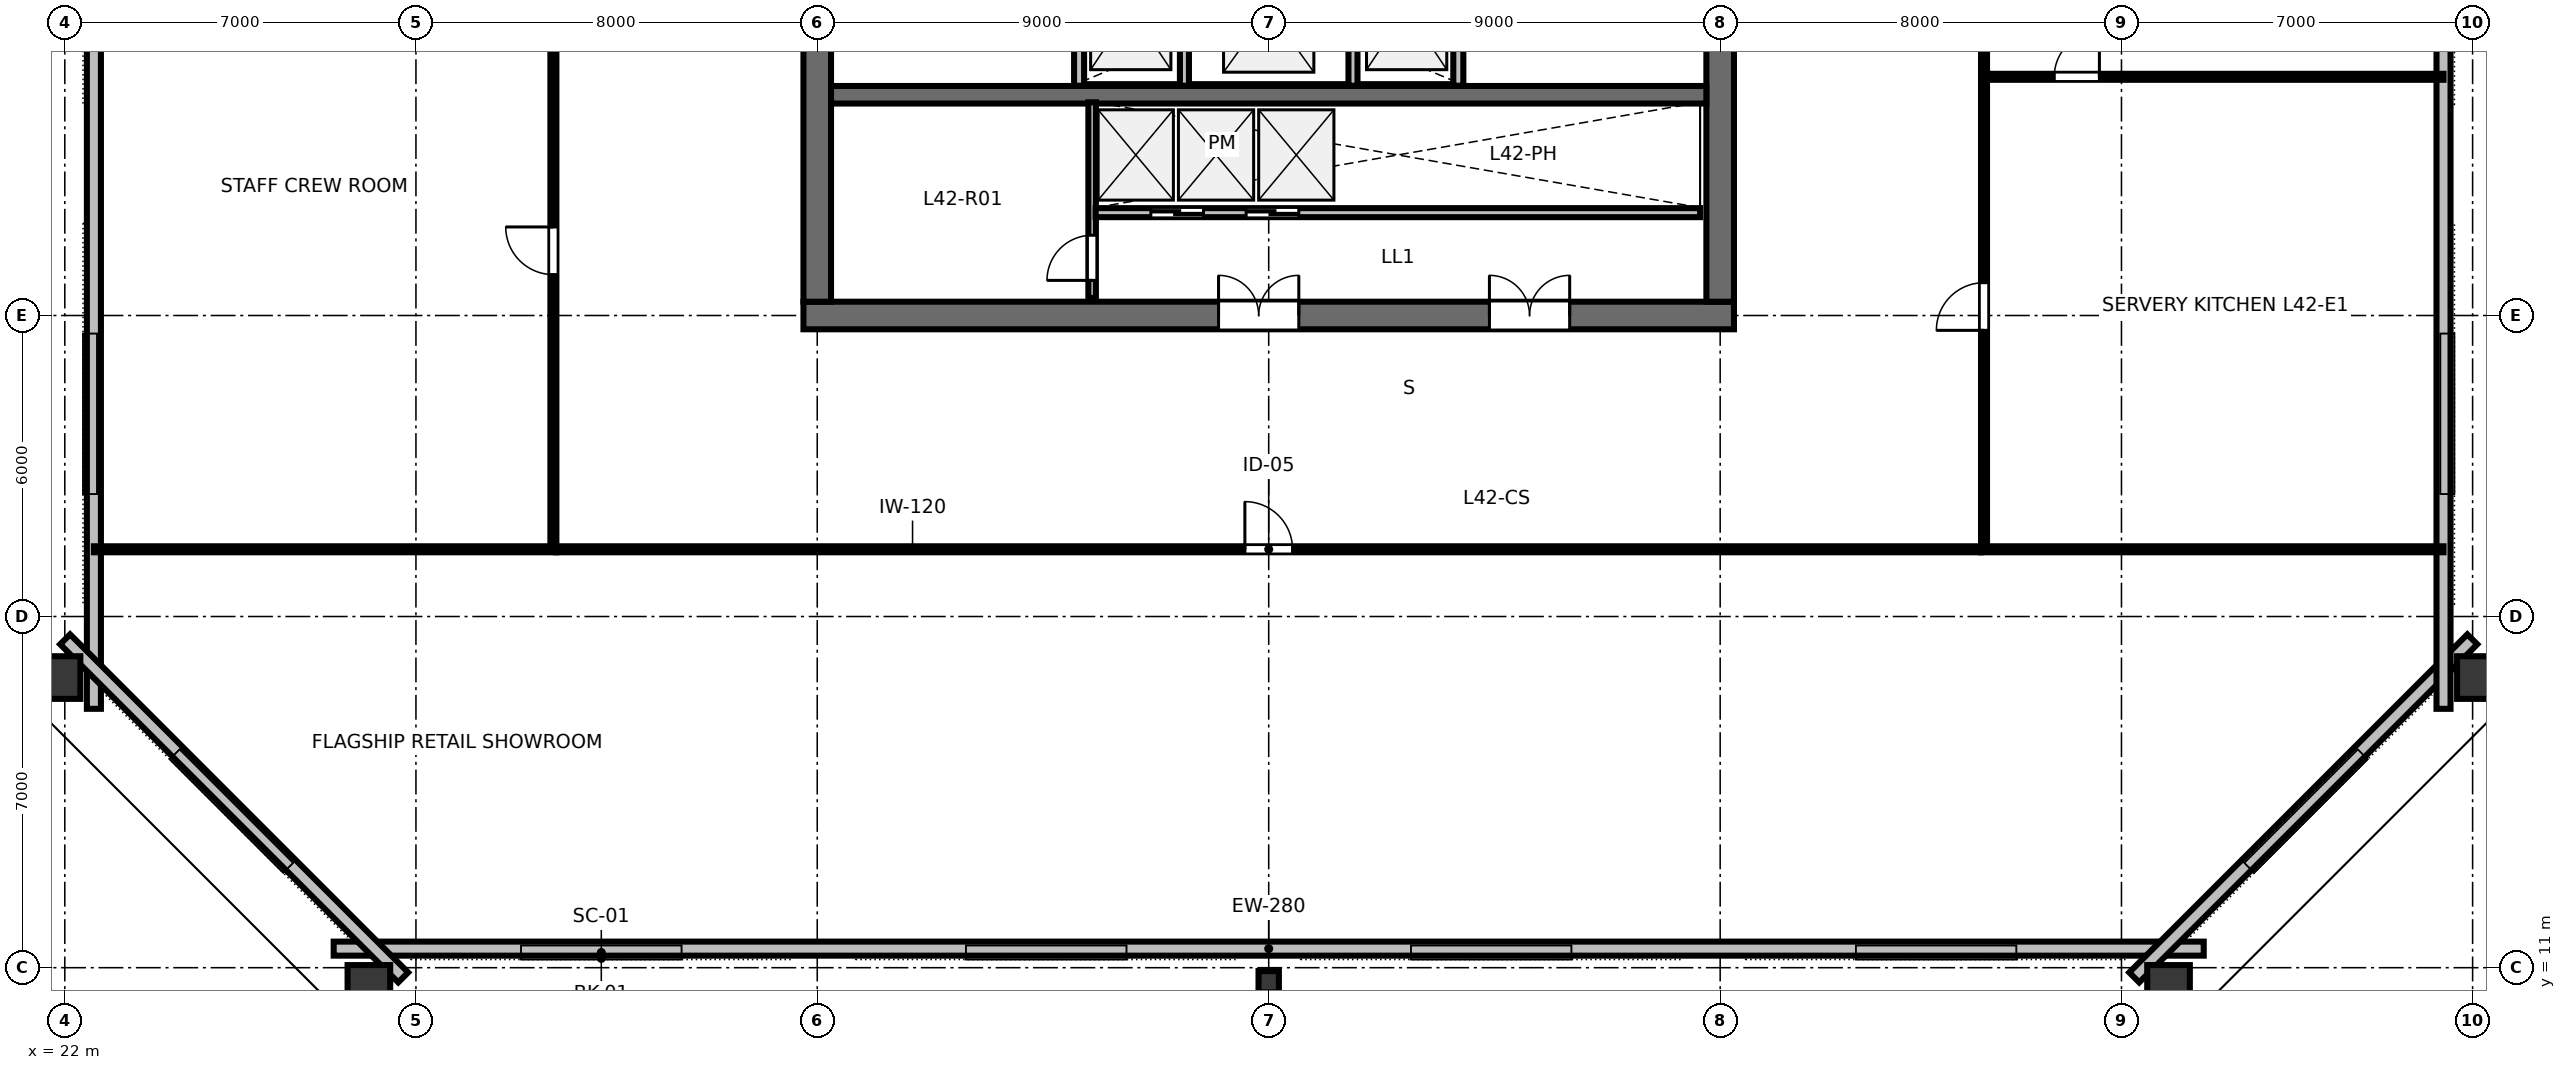
"""IFC4 building model, lengths in metres.
Left out: names, types, materials, properties, quantities, classifications, styles, units other than length and angle.
Written with IfcOpenShell. Run it as: python <this file> out.ifc"""

import sys

from ifc_helpers import new_model, si_unit, direction, frame, frame_2d, origin, origin_2d, place, context, subcontext, project, spatial, rectangle, hollow_rectangle, i_section, extrude, element, fill, save


model = new_model("IFC4")
c1 = context("Model", 3, precision=1e-05, world=origin(), true_north=direction((0.0, 1.0)))
c2 = subcontext(c1, "Body", "Model", "MODEL_VIEW")
j1 = project(units=[si_unit("LENGTHUNIT", "METRE"), si_unit("PLANEANGLEUNIT", "RADIAN")], contexts=[c1])
p1 = place(None, origin())
s1 = spatial("IfcSite", under=j1, at=p1, CompositionType="ELEMENT")
p2 = place(p1, origin())
s2 = spatial("IfcBuilding", under=s1, at=p2, CompositionType="ELEMENT")
p3 = place(p2, frame((0.0, 0.0, 160.0)))
s3 = spatial("IfcBuildingStorey", under=s2, at=p3, CompositionType="ELEMENT", Elevation=160.0)
p4 = place(p3, frame((36.725, 24.0, 0.0), z_axis=(0.0, 0.0, 1.0), x_axis=(1.0, 0.0, 0.0)))
e1 = element("IfcWall", 1, at=p4, inside=s3, PredefinedType="SHEAR", context=c2, shape_type="SweptSolid", body=[
    extrude(rectangle(XDim=18.55, YDim=0.55, at=frame_2d((9.275, 0.0))), origin(), (0.0, 0.0, 1.0), 3.36),
])
p5 = place(p4, frame((8.275, 0.0, 0.0)))
e2 = element("IfcOpeningElement", 2, at=p5, cuts=e1, PredefinedType="OPENING", context=c2, shape_type="SweptSolid", body=[
    extrude(rectangle(XDim=1.6, YDim=2.15, at=frame_2d((0.8, 1.075))), frame((0.0, 0.285, 0.0), z_axis=(0.0, -1.0, 0.0), x_axis=(1.0, 0.0, 0.0)), (0.0, 0.0, 1.0), 0.57),
])
p6 = place(p4, frame((13.675, 0.0, 0.0)))
e3 = element("IfcOpeningElement", 3, at=p6, cuts=e1, PredefinedType="OPENING", context=c2, shape_type="SweptSolid", body=[
    extrude(rectangle(XDim=1.6, YDim=2.15, at=frame_2d((0.8, 1.075))), frame((0.0, 0.285, 0.0), z_axis=(0.0, -1.0, 0.0), x_axis=(1.0, 0.0, 0.0)), (0.0, 0.0, 1.0), 0.57),
])
p7 = place(p3, frame((37.0, 24.275, 0.0), z_axis=(0.0, 0.0, 1.0), x_axis=(0.0, 1.0, 0.0)))
e4 = element("IfcWall", 4, at=p7, inside=s3, PredefinedType="SHEAR", context=c2, shape_type="SweptSolid", body=[
    extrude(rectangle(XDim=15.45, YDim=0.55, at=frame_2d((7.725, 0.0))), origin(), (0.0, 0.0, 1.0), 3.36),
])
p8 = place(p7, frame((5.25, 0.0, 0.0)))
e5 = element("IfcOpeningElement", 5, at=p8, cuts=e4, PredefinedType="OPENING", context=c2, shape_type="SweptSolid", body=[
    extrude(rectangle(XDim=1.15, YDim=2.15, at=frame_2d((0.575, 1.075))), frame((0.0, 0.285, 0.0), z_axis=(0.0, -1.0, 0.0), x_axis=(1.0, 0.0, 0.0)), (0.0, 0.0, 1.0), 0.57),
])
p9 = place(p3, frame((55.0, 24.275, 0.0), z_axis=(0.0, 0.0, 1.0), x_axis=(0.0, 1.0, 0.0)))
e6 = element("IfcWall", 6, at=p9, inside=s3, PredefinedType="SHEAR", context=c2, shape_type="SweptSolid", body=[
    extrude(rectangle(XDim=15.45, YDim=0.55, at=frame_2d((7.725, 0.0))), origin(), (0.0, 0.0, 1.0), 3.36),
])
p10 = place(p9, frame((5.25, 0.0, 0.0)))
e7 = element("IfcOpeningElement", 7, at=p10, cuts=e6, PredefinedType="OPENING", context=c2, shape_type="SweptSolid", body=[
    extrude(rectangle(XDim=1.15, YDim=2.15, at=frame_2d((0.575, 1.075))), frame((0.0, 0.285, 0.0), z_axis=(0.0, -1.0, 0.0), x_axis=(1.0, 0.0, 0.0)), (0.0, 0.0, 1.0), 0.57),
])
p11 = place(p3, frame((37.275, 28.4, 0.0), z_axis=(0.0, 0.0, 1.0), x_axis=(1.0, 0.0, 0.0)))
e8 = element("IfcWall", 8, at=p11, inside=s3, PredefinedType="SHEAR", context=c2, shape_type="SweptSolid", body=[
    extrude(rectangle(XDim=17.45, YDim=0.35, at=frame_2d((8.725, 0.0))), origin(), (0.0, 0.0, 1.0), 3.36),
])
p12 = place(p3, frame((28.062, 10.552, 0.0), z_axis=(0.0, 0.0, 1.0), x_axis=(1.0, 0.0, 0.0)))
e9 = element("IfcColumn", 9, at=p12, inside=s3, PredefinedType="COLUMN", context=c2, shape_type="SweptSolid", body=[
    extrude(hollow_rectangle(XDim=0.85, YDim=1.0, WallThickness=0.05, at=origin_2d()), origin(), (0.0, 0.0, 1.0), 3.358),
])
p13 = place(p3, frame((46.0, 10.72, 0.0), z_axis=(0.0, 0.0, 1.0), x_axis=(1.0, 0.0, 0.0)))
e10 = element("IfcColumn", 10, at=p13, inside=s3, PredefinedType="COLUMN", context=c2, shape_type="SweptSolid", body=[
    extrude(i_section(OverallWidth=0.406, OverallDepth=0.425, WebThickness=0.033, FlangeThickness=0.052, FilletRadius=0.025, at=origin_2d()), origin(), (0.0, 0.0, 1.0), 3.358),
])
for number, where, z_axis, x_axis in (
    (11, (63.938, 10.552, 0.0), (0.0, 0.0, 1.0), (1.0, 0.0, 0.0)),
    (12, (70.19, 16.783, 0.0), (0.0, 0.0, 1.0), (0.0, 1.0, 0.0)),
    (13, (21.81, 16.783, 0.0), (0.0, 0.0, 1.0), (0.0, 1.0, 0.0)),
):
    element("IfcColumn", number, at=place(p3, frame(where, z_axis=z_axis, x_axis=x_axis)), inside=s3, PredefinedType="COLUMN", context=c2, shape_type="SweptSolid", body=[
        extrude(hollow_rectangle(XDim=0.85, YDim=1.0, WallThickness=0.05, at=origin_2d()), origin(), (0.0, 0.0, 1.0), 3.358),
    ])
p14 = place(p3, frame((27.36, 11.38, 0.0), z_axis=(0.0, 0.0, 1.0), x_axis=(1.0, 0.0, 0.0)))
e14 = element("IfcWall", 14, at=p14, inside=s3, PredefinedType="STANDARD", context=c2, shape_type="SweptSolid", body=[
    extrude(rectangle(XDim=37.28, YDim=0.28, at=frame_2d((18.64, 0.0))), origin(), (0.0, 0.0, 1.0), 3.36),
])
p15 = place(p3, frame((63.254, 10.806, 0.0), z_axis=(0.0, 0.0, 1.0), x_axis=(0.707119588888, 0.707093973253, 0.0)))
e15 = element("IfcWall", 15, at=p15, inside=s3, PredefinedType="STANDARD", context=c2, shape_type="SweptSolid", body=[
    extrude(rectangle(XDim=9.531, YDim=0.28, at=frame_2d((4.766, 0.0))), origin(), (0.0, 0.0, 1.0), 3.36),
])
for number, where, z_axis, x_axis in (
    (16, (69.42, 16.16, 0.0), (0.0, 0.0, 1.0), (0.0, 1.0, 0.0)),
    (17, (22.58, 47.84, 0.0), (0.0, 0.0, 1.0), (0.0, -1.0, 0.0)),
):
    element("IfcWall", number, at=place(p3, frame(where, z_axis=z_axis, x_axis=x_axis)), inside=s3, PredefinedType="STANDARD", context=c2, shape_type="SweptSolid", body=[
        extrude(rectangle(XDim=31.68, YDim=0.28, at=frame_2d((15.84, 0.0))), origin(), (0.0, 0.0, 1.0), 3.36),
    ])
p16 = place(p3, frame((22.006, 17.545, 0.0), z_axis=(0.0, 0.0, 1.0), x_axis=(0.707119588888, -0.707093973253, 0.0)))
e18 = element("IfcWall", 18, at=p16, inside=s3, PredefinedType="STANDARD", context=c2, shape_type="SweptSolid", body=[
    extrude(rectangle(XDim=9.531, YDim=0.28, at=frame_2d((4.766, 0.0))), origin(), (0.0, 0.0, 1.0), 3.36),
])
p17 = place(p3, frame((42.22, 28.58, 0.0), z_axis=(0.0, 0.0, 1.0), x_axis=(0.0, 1.0, 0.0)))
e19 = element("IfcWall", 19, at=p17, inside=s3, PredefinedType="PARTITIONING", context=c2, shape_type="SweptSolid", body=[
    extrude(rectangle(XDim=3.04, YDim=0.2, at=frame_2d((1.52, 0.0))), origin(), (0.0, 0.0, 1.0), 3.36),
])
p18 = place(p17, frame((0.95, 0.0, 0.0)))
e20 = element("IfcOpeningElement", 20, at=p18, cuts=e19, PredefinedType="OPENING", context=c2, shape_type="SweptSolid", body=[
    extrude(rectangle(XDim=1.05, YDim=2.15, at=frame_2d((0.525, 1.075))), frame((0.0, 0.11, 0.0), z_axis=(0.0, -1.0, 0.0), x_axis=(1.0, 0.0, 0.0)), (0.0, 0.0, 1.0), 0.22),
])
p19 = place(p3, frame((49.78, 28.58, 0.0), z_axis=(0.0, 0.0, 1.0), x_axis=(0.0, 1.0, 0.0)))
e21 = element("IfcWall", 21, at=p19, inside=s3, PredefinedType="PARTITIONING", context=c2, shape_type="SweptSolid", body=[
    extrude(rectangle(XDim=3.04, YDim=0.2, at=frame_2d((1.52, 0.0))), origin(), (0.0, 0.0, 1.0), 3.36),
])
p20 = place(p19, frame((0.95, 0.0, 0.0)))
e22 = element("IfcOpeningElement", 22, at=p20, cuts=e21, PredefinedType="OPENING", context=c2, shape_type="SweptSolid", body=[
    extrude(rectangle(XDim=1.05, YDim=2.15, at=frame_2d((0.525, 1.075))), frame((0.0, 0.11, 0.0), z_axis=(0.0, -1.0, 0.0), x_axis=(1.0, 0.0, 0.0)), (0.0, 0.0, 1.0), 0.22),
])
for number, where, z_axis, x_axis in (
    (23, (44.32, 28.58, 0.0), (0.0, 0.0, 1.0), (0.0, 1.0, 0.0)),
    (24, (47.68, 28.58, 0.0), (0.0, 0.0, 1.0), (0.0, 1.0, 0.0)),
):
    element("IfcWall", number, at=place(p3, frame(where, z_axis=z_axis, x_axis=x_axis)), inside=s3, PredefinedType="PARTITIONING", context=c2, shape_type="SweptSolid", body=[
        extrude(rectangle(XDim=3.04, YDim=0.18, at=frame_2d((1.52, 0.0))), origin(), (0.0, 0.0, 1.0), 3.36),
    ])
p21 = place(p3, frame((42.48, 24.35, 0.0), z_axis=(0.0, 0.0, 1.0), x_axis=(0.0, 1.0, 0.0)))
e25 = element("IfcWall", 25, at=p21, inside=s3, PredefinedType="PARTITIONING", context=c2, shape_type="SweptSolid", body=[
    extrude(rectangle(XDim=3.9, YDim=0.15, at=frame_2d((1.95, 0.0))), origin(), (0.0, 0.0, 1.0), 3.36),
])
p22 = place(p21, frame((0.35, 0.0, 0.0)))
e26 = element("IfcOpeningElement", 26, at=p22, cuts=e25, PredefinedType="OPENING", context=c2, shape_type="SweptSolid", body=[
    extrude(rectangle(XDim=0.9, YDim=2.15, at=frame_2d((0.45, 1.075))), frame((0.0, 0.085, 0.0), z_axis=(0.0, -1.0, 0.0), x_axis=(1.0, 0.0, 0.0)), (0.0, 0.0, 1.0), 0.17),
])
p23 = place(p3, frame((42.55, 26.05, 0.0), z_axis=(0.0, 0.0, 1.0), x_axis=(1.0, 0.0, 0.0)))
e27 = element("IfcWall", 27, at=p23, inside=s3, PredefinedType="PARTITIONING", context=c2, shape_type="SweptSolid", body=[
    extrude(rectangle(XDim=12.05, YDim=0.18, at=frame_2d((6.025, 0.0))), origin(), (0.0, 0.0, 1.0), 3.36),
])
p24 = place(p23, frame((1.1, 0.0, 0.0)))
e28 = element("IfcOpeningElement", 28, at=p24, cuts=e27, PredefinedType="OPENING", context=c2, shape_type="SweptSolid", body=[
    extrude(rectangle(XDim=1.05, YDim=2.15, at=frame_2d((0.525, 1.075))), frame((0.0, 0.1, 0.0), z_axis=(0.0, -1.0, 0.0), x_axis=(1.0, 0.0, 0.0)), (0.0, 0.0, 1.0), 0.2),
])
p25 = place(p23, frame((3.0, 0.0, 0.0)))
e29 = element("IfcOpeningElement", 29, at=p25, cuts=e27, PredefinedType="OPENING", context=c2, shape_type="SweptSolid", body=[
    extrude(rectangle(XDim=1.05, YDim=2.15, at=frame_2d((0.525, 1.075))), frame((0.0, 0.1, 0.0), z_axis=(0.0, -1.0, 0.0), x_axis=(1.0, 0.0, 0.0)), (0.0, 0.0, 1.0), 0.2),
])
p26 = place(p3, frame((31.8, 19.34, 0.0), z_axis=(0.0, 0.0, 1.0), x_axis=(1.0, 0.0, 0.0)))
e30 = element("IfcWall", 30, at=p26, inside=s3, PredefinedType="PARTITIONING", context=c2, shape_type="SweptSolid", body=[
    extrude(rectangle(XDim=28.4, YDim=0.12, at=frame_2d((14.2, 0.0))), origin(), (0.0, 0.0, 1.0), 2.64),
])
p27 = place(p26, frame((13.725, 0.0, 0.0)))
e31 = element("IfcOpeningElement", 31, at=p27, cuts=e30, PredefinedType="OPENING", context=c2, shape_type="SweptSolid", body=[
    extrude(rectangle(XDim=0.95, YDim=2.15, at=frame_2d((0.475, 1.075))), frame((0.0, 0.07, 0.0), z_axis=(0.0, -1.0, 0.0), x_axis=(1.0, 0.0, 0.0)), (0.0, 0.0, 1.0), 0.14),
])
p28 = place(p3, frame((31.74, 19.4, 0.0), z_axis=(0.0, 0.0, 1.0), x_axis=(0.0, 1.0, 0.0)))
e32 = element("IfcWall", 32, at=p28, inside=s3, PredefinedType="PARTITIONING", context=c2, shape_type="SweptSolid", body=[
    extrude(rectangle(XDim=11.58, YDim=0.12, at=frame_2d((5.79, 0.0))), origin(), (0.0, 0.0, 1.0), 2.64),
])
p29 = place(p28, frame((5.415, 0.0, 0.0)))
e33 = element("IfcOpeningElement", 33, at=p29, cuts=e32, PredefinedType="OPENING", context=c2, shape_type="SweptSolid", body=[
    extrude(rectangle(XDim=0.95, YDim=2.15, at=frame_2d((0.475, 1.075))), frame((0.0, 0.07, 0.0), z_axis=(0.0, -1.0, 0.0), x_axis=(1.0, 0.0, 0.0)), (0.0, 0.0, 1.0), 0.14),
])
p30 = place(p3, frame((60.26, 28.758, 0.0), z_axis=(0.0, 0.0, 1.0), x_axis=(1.0, 0.0, 0.0)))
e34 = element("IfcWall", 34, at=p30, inside=s3, PredefinedType="PARTITIONING", context=c2, shape_type="SweptSolid", body=[
    extrude(rectangle(XDim=9.16, YDim=0.12, at=frame_2d((4.58, 0.0))), origin(), (0.0, 0.0, 1.0), 2.64),
])
p31 = place(p30, frame((1.4, 0.0, 0.0)))
e35 = element("IfcOpeningElement", 35, at=p31, cuts=e34, PredefinedType="OPENING", context=c2, shape_type="SweptSolid", body=[
    extrude(rectangle(XDim=0.9, YDim=2.15, at=frame_2d((0.45, 1.075))), frame((0.0, 0.07, 0.0), z_axis=(0.0, -1.0, 0.0), x_axis=(1.0, 0.0, 0.0)), (0.0, 0.0, 1.0), 0.14),
])
p32 = place(p3, frame((60.26, 19.4, 0.0), z_axis=(0.0, 0.0, 1.0), x_axis=(0.0, 1.0, 0.0)))
e36 = element("IfcWall", 36, at=p32, inside=s3, PredefinedType="PARTITIONING", context=c2, shape_type="SweptSolid", body=[
    extrude(rectangle(XDim=11.58, YDim=0.12, at=frame_2d((5.79, 0.0))), origin(), (0.0, 0.0, 1.0), 2.64),
])
p33 = place(p32, frame((4.304, 0.0, 0.0)))
e37 = element("IfcOpeningElement", 37, at=p33, cuts=e36, PredefinedType="OPENING", context=c2, shape_type="SweptSolid", body=[
    extrude(rectangle(XDim=0.95, YDim=2.15, at=frame_2d((0.475, 1.075))), frame((0.0, 0.07, 0.0), z_axis=(0.0, -1.0, 0.0), x_axis=(1.0, 0.0, 0.0)), (0.0, 0.0, 1.0), 0.14),
])
p34 = place(p32, frame((9.994, 0.0, 0.0)))
e38 = element("IfcOpeningElement", 38, at=p34, cuts=e36, PredefinedType="OPENING", context=c2, shape_type="SweptSolid", body=[
    extrude(rectangle(XDim=0.95, YDim=2.15, at=frame_2d((0.475, 1.075))), frame((0.0, 0.07, 0.0), z_axis=(0.0, -1.0, 0.0), x_axis=(1.0, 0.0, 0.0)), (0.0, 0.0, 1.0), 0.14),
])
for number, where, z_axis, x_axis in (
    (39, (31.8, 19.34, 0.0), (0.0, 0.0, 1.0), (-1.0, 0.0, 0.0)),
    (40, (60.2, 19.34, 0.0), (0.0, 0.0, 1.0), (1.0, 0.0, 0.0)),
):
    element("IfcWall", number, at=place(p3, frame(where, z_axis=z_axis, x_axis=x_axis)), inside=s3, PredefinedType="PARTITIONING", context=c2, shape_type="SweptSolid", body=[
        extrude(rectangle(XDim=9.22, YDim=0.12, at=frame_2d((4.61, 0.0))), origin(), (0.0, 0.0, 1.0), 2.64),
    ])
p35 = place(p5, origin())
e41 = element("IfcDoor", 41, at=p35, inside=s3, OperationType="DOUBLE_DOOR_SINGLE_SWING", PredefinedType="DOOR", context=c2, shape_type="SweptSolid", body=[
    extrude(rectangle(XDim=1.6, YDim=2.15, at=frame_2d((0.8, 1.075))), frame((0.0, 0.025, 0.0), z_axis=(0.0, -1.0, 0.0), x_axis=(1.0, 0.0, 0.0)), (0.0, 0.0, 1.0), 0.05),
])
fill(e2, e41)
p36 = place(p6, origin())
e42 = element("IfcDoor", 42, at=p36, inside=s3, OperationType="DOUBLE_DOOR_SINGLE_SWING", PredefinedType="DOOR", context=c2, shape_type="SweptSolid", body=[
    extrude(rectangle(XDim=1.6, YDim=2.15, at=frame_2d((0.8, 1.075))), frame((0.0, 0.025, 0.0), z_axis=(0.0, -1.0, 0.0), x_axis=(1.0, 0.0, 0.0)), (0.0, 0.0, 1.0), 0.05),
])
fill(e3, e42)
p37 = place(p22, origin())
e43 = element("IfcDoor", 43, at=p37, inside=s3, OperationType="SINGLE_SWING_LEFT", PredefinedType="DOOR", context=c2, shape_type="SweptSolid", body=[
    extrude(rectangle(XDim=0.9, YDim=2.15, at=frame_2d((0.45, 1.075))), frame((0.0, 0.025, 0.0), z_axis=(0.0, -1.0, 0.0), x_axis=(1.0, 0.0, 0.0)), (0.0, 0.0, 1.0), 0.05),
])
fill(e26, e43)
p38 = place(p24, origin())
e44 = element("IfcDoor", 44, at=p38, inside=s3, OperationType="SLIDING_TO_LEFT", PredefinedType="DOOR", context=c2, shape_type="SweptSolid", body=[
    extrude(rectangle(XDim=1.05, YDim=2.15, at=frame_2d((0.525, 1.075))), frame((0.0, 0.025, 0.0), z_axis=(0.0, -1.0, 0.0), x_axis=(1.0, 0.0, 0.0)), (0.0, 0.0, 1.0), 0.05),
])
fill(e28, e44)
p39 = place(p25, origin())
e45 = element("IfcDoor", 45, at=p39, inside=s3, OperationType="SLIDING_TO_RIGHT", PredefinedType="DOOR", context=c2, shape_type="SweptSolid", body=[
    extrude(rectangle(XDim=1.05, YDim=2.15, at=frame_2d((0.525, 1.075))), frame((0.0, 0.025, 0.0), z_axis=(0.0, -1.0, 0.0), x_axis=(1.0, 0.0, 0.0)), (0.0, 0.0, 1.0), 0.05),
])
fill(e29, e45)
p40 = place(p27, origin())
e46 = element("IfcDoor", 46, at=p40, inside=s3, OperationType="SINGLE_SWING_LEFT", PredefinedType="DOOR", context=c2, shape_type="SweptSolid", body=[
    extrude(rectangle(XDim=0.95, YDim=2.15, at=frame_2d((0.475, 1.075))), frame((0.0, 0.025, 0.0), z_axis=(0.0, -1.0, 0.0), x_axis=(1.0, 0.0, 0.0)), (0.0, 0.0, 1.0), 0.05),
])
fill(e31, e46)
p41 = place(p29, origin())
e47 = element("IfcDoor", 47, at=p41, inside=s3, OperationType="SINGLE_SWING_RIGHT", PredefinedType="DOOR", context=c2, shape_type="SweptSolid", body=[
    extrude(rectangle(XDim=0.95, YDim=2.15, at=frame_2d((0.475, 1.075))), frame((0.0, 0.025, 0.0), z_axis=(0.0, -1.0, 0.0), x_axis=(1.0, 0.0, 0.0)), (0.0, 0.0, 1.0), 0.05),
])
fill(e33, e47)
p42 = place(p31, origin())
e48 = element("IfcDoor", 48, at=p42, inside=s3, OperationType="SINGLE_SWING_RIGHT", PredefinedType="DOOR", context=c2, shape_type="SweptSolid", body=[
    extrude(rectangle(XDim=0.9, YDim=2.15, at=frame_2d((0.45, 1.075))), frame((0.0, 0.025, 0.0), z_axis=(0.0, -1.0, 0.0), x_axis=(1.0, 0.0, 0.0)), (0.0, 0.0, 1.0), 0.05),
])
fill(e35, e48)
p43 = place(p33, origin())
e49 = element("IfcDoor", 49, at=p43, inside=s3, OperationType="SINGLE_SWING_LEFT", PredefinedType="DOOR", context=c2, shape_type="SweptSolid", body=[
    extrude(rectangle(XDim=0.95, YDim=2.15, at=frame_2d((0.475, 1.075))), frame((0.0, 0.025, 0.0), z_axis=(0.0, -1.0, 0.0), x_axis=(1.0, 0.0, 0.0)), (0.0, 0.0, 1.0), 0.05),
])
fill(e37, e49)
save(model, sys.argv[1])
